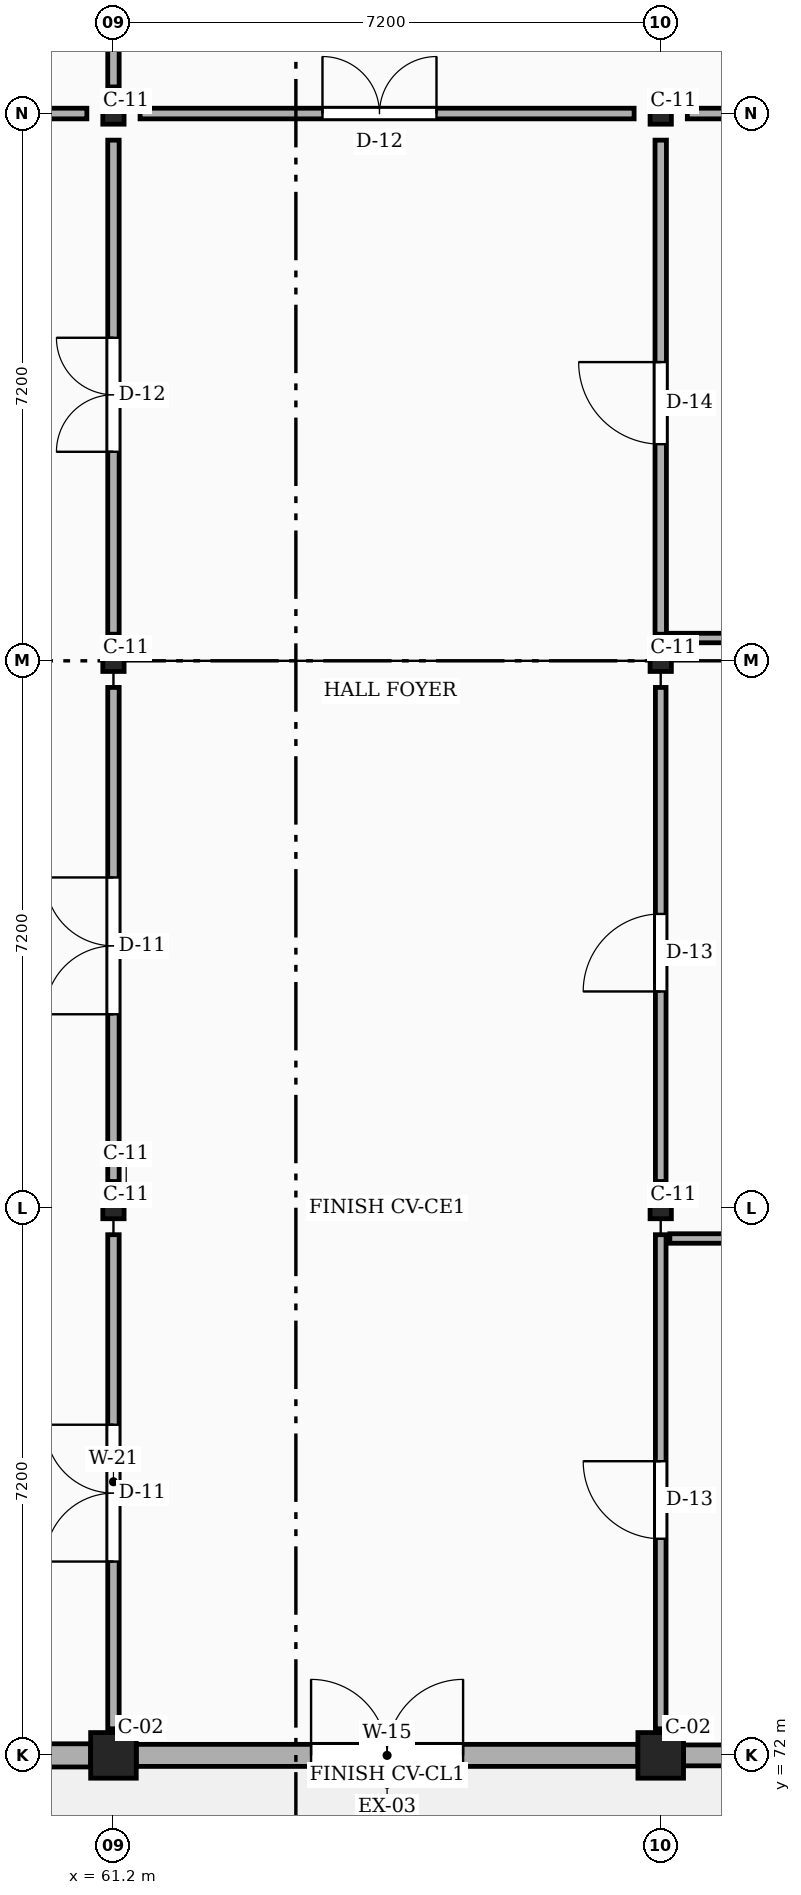
"""IFC4 building model, lengths in metres.
Left out: names, types, materials, properties, quantities, classifications, styles, units other than length and angle.
Written with IfcOpenShell. Run it as: python <this file> out.ifc"""

import sys

from ifc_helpers import new_model, si_unit, direction, frame, frame_2d, origin, origin_2d, place, context, subcontext, project, spatial, rectangle, i_section, extrude, element, fill, save


model = new_model("IFC4")
c1 = context("Model", 3, precision=1e-05, world=origin(), true_north=direction((0.0, 1.0)))
c2 = subcontext(c1, "Body", "Model", "MODEL_VIEW")
j1 = project(units=[si_unit("LENGTHUNIT", "METRE"), si_unit("PLANEANGLEUNIT", "RADIAN")], contexts=[c1])
p1 = place(None, origin())
s1 = spatial("IfcSite", under=j1, at=p1, CompositionType="ELEMENT")
p2 = place(p1, origin())
s2 = spatial("IfcBuilding", under=s1, at=p2, CompositionType="ELEMENT")
p3 = place(p2, origin())
s3 = spatial("IfcBuildingStorey", under=s2, at=p3, CompositionType="ELEMENT", Elevation=0.0)
p4 = place(p3, frame((61.2, 72.0, 0.0), z_axis=(0.0, 0.0, 1.0), x_axis=(1.0, 0.0, 0.0)))
e1 = element("IfcColumn", 1, at=p4, inside=s3, PredefinedType="COLUMN", context=c2, shape_type="SweptSolid", body=[
    extrude(rectangle(XDim=0.6, YDim=0.6, at=origin_2d()), origin(), (0.0, 0.0, 1.0), 8.1),
])
for number, where, z_axis, x_axis in (
    (2, (61.2, 79.2, 0.0), (0.0, 0.0, 1.0), (1.0, 0.0, 0.0)),
    (3, (61.2, 86.4, 0.0), (0.0, 0.0, 1.0), (1.0, 0.0, 0.0)),
    (4, (61.2, 93.6, 0.0), (0.0, 0.0, 1.0), (1.0, 0.0, 0.0)),
):
    element("IfcColumn", number, at=place(p3, frame(where, z_axis=z_axis, x_axis=x_axis)), inside=s3, PredefinedType="COLUMN", context=c2, shape_type="SweptSolid", body=[
        extrude(i_section(OverallWidth=0.28, OverallDepth=0.28, WebThickness=0.01, FlangeThickness=0.018, FilletRadius=0.024, at=origin_2d()), origin(), (0.0, 0.0, 1.0), 8.1),
    ])
p5 = place(p3, frame((68.4, 72.0, 0.0), z_axis=(0.0, 0.0, 1.0), x_axis=(1.0, 0.0, 0.0)))
e5 = element("IfcColumn", 5, at=p5, inside=s3, PredefinedType="COLUMN", context=c2, shape_type="SweptSolid", body=[
    extrude(rectangle(XDim=0.6, YDim=0.6, at=origin_2d()), origin(), (0.0, 0.0, 1.0), 8.1),
])
for number, where, z_axis, x_axis in (
    (6, (68.4, 79.2, 0.0), (0.0, 0.0, 1.0), (1.0, 0.0, 0.0)),
    (7, (68.4, 86.4, 0.0), (0.0, 0.0, 1.0), (1.0, 0.0, 0.0)),
    (8, (68.4, 93.6, 0.0), (0.0, 0.0, 1.0), (1.0, 0.0, 0.0)),
):
    element("IfcColumn", number, at=place(p3, frame(where, z_axis=z_axis, x_axis=x_axis)), inside=s3, PredefinedType="COLUMN", context=c2, shape_type="SweptSolid", body=[
        extrude(i_section(OverallWidth=0.28, OverallDepth=0.28, WebThickness=0.01, FlangeThickness=0.018, FilletRadius=0.024, at=origin_2d()), origin(), (0.0, 0.0, 1.0), 8.1),
    ])
p6 = place(p3, frame((54.3, 72.0, 0.0), z_axis=(0.0, 0.0, 1.0), x_axis=(1.0, 0.0, 0.0)))
e9 = element("IfcWall", 9, at=p6, inside=s3, PredefinedType="SOLIDWALL", context=c2, shape_type="SweptSolid", body=[
    extrude(rectangle(XDim=6.6, YDim=0.305, at=frame_2d((3.3, 0.0))), origin(), (0.0, 0.0, 1.0), 6.525),
])
p7 = place(p6, frame((2.4, 0.0, 0.0)))
e10 = element("IfcOpeningElement", 10, at=p7, cuts=e9, PredefinedType="OPENING", context=c2, shape_type="SweptSolid", body=[
    extrude(rectangle(XDim=1.8, YDim=2.2, at=frame_2d((0.9, 1.1))), frame((0.0, 0.163, 0.0), z_axis=(0.0, -1.0, 0.0), x_axis=(1.0, 0.0, 0.0)), (0.0, 0.0, 1.0), 0.325),
])
p8 = place(p3, frame((61.5, 72.0, 0.0), z_axis=(0.0, 0.0, 1.0), x_axis=(1.0, 0.0, 0.0)))
e11 = element("IfcWall", 11, at=p8, inside=s3, PredefinedType="SOLIDWALL", context=c2, shape_type="SweptSolid", body=[
    extrude(rectangle(XDim=6.6, YDim=0.29, at=frame_2d((3.3, 0.0))), origin(), (0.0, 0.0, 1.0), 6.525),
])
p9 = place(p8, frame((2.3, 0.0, 0.0)))
e12 = element("IfcOpeningElement", 12, at=p9, cuts=e11, PredefinedType="OPENING", context=c2, shape_type="SweptSolid", body=[
    extrude(rectangle(XDim=2.0, YDim=2.3, at=frame_2d((1.0, 1.15))), frame((0.0, 0.155, 0.0), z_axis=(0.0, -1.0, 0.0), x_axis=(1.0, 0.0, 0.0)), (0.0, 0.0, 1.0), 0.31),
])
p10 = place(p3, frame((68.7, 72.0, 0.0), z_axis=(0.0, 0.0, 1.0), x_axis=(1.0, 0.0, 0.0)))
e13 = element("IfcWall", 13, at=p10, inside=s3, PredefinedType="SOLIDWALL", context=c2, shape_type="SweptSolid", body=[
    extrude(rectangle(XDim=6.6, YDim=0.275, at=frame_2d((3.3, 0.0))), origin(), (0.0, 0.0, 1.0), 6.525),
])
p11 = place(p10, frame((2.4, 0.0, 0.85)))
e14 = element("IfcOpeningElement", 14, at=p11, cuts=e13, PredefinedType="OPENING", context=c2, shape_type="SweptSolid", body=[
    extrude(rectangle(XDim=1.8, YDim=2.1, at=frame_2d((0.9, 1.05))), frame((0.0, 0.147, 0.0), z_axis=(0.0, -1.0, 0.0), x_axis=(1.0, 0.0, 0.0)), (0.0, 0.0, 1.0), 0.295),
])
p12 = place(p3, frame((61.2, 72.35, 0.0), z_axis=(0.0, 0.0, 1.0), x_axis=(0.0, 1.0, 0.0)))
e15 = element("IfcWall", 15, at=p12, inside=s3, PredefinedType="PARTITIONING", context=c2, shape_type="SweptSolid", body=[
    extrude(rectangle(XDim=6.5, YDim=0.15, at=frame_2d((3.25, 0.0))), origin(), (0.0, 0.0, 1.0), 4.1),
])
p13 = place(p12, frame((2.2, 0.0, 0.0)))
e16 = element("IfcOpeningElement", 16, at=p13, cuts=e15, PredefinedType="OPENING", context=c2, shape_type="SweptSolid", body=[
    extrude(rectangle(XDim=1.8, YDim=2.3, at=frame_2d((0.9, 1.15))), frame((0.0, 0.085, 0.0), z_axis=(0.0, -1.0, 0.0), x_axis=(1.0, 0.0, 0.0)), (0.0, 0.0, 1.0), 0.17),
])
p14 = place(p3, frame((61.2, 79.55, 0.0), z_axis=(0.0, 0.0, 1.0), x_axis=(0.0, 1.0, 0.0)))
e17 = element("IfcWall", 17, at=p14, inside=s3, PredefinedType="PARTITIONING", context=c2, shape_type="SweptSolid", body=[
    extrude(rectangle(XDim=6.5, YDim=0.15, at=frame_2d((3.25, 0.0))), origin(), (0.0, 0.0, 1.0), 4.1),
])
p15 = place(p14, frame((2.2, 0.0, 0.0)))
e18 = element("IfcOpeningElement", 18, at=p15, cuts=e17, PredefinedType="OPENING", context=c2, shape_type="SweptSolid", body=[
    extrude(rectangle(XDim=1.8, YDim=2.3, at=frame_2d((0.9, 1.15))), frame((0.0, 0.085, 0.0), z_axis=(0.0, -1.0, 0.0), x_axis=(1.0, 0.0, 0.0)), (0.0, 0.0, 1.0), 0.17),
])
p16 = place(p3, frame((61.2, 86.75, 0.0), z_axis=(0.0, 0.0, 1.0), x_axis=(0.0, 1.0, 0.0)))
e19 = element("IfcWall", 19, at=p16, inside=s3, PredefinedType="PARTITIONING", context=c2, shape_type="SweptSolid", body=[
    extrude(rectangle(XDim=6.5, YDim=0.15, at=frame_2d((3.25, 0.0))), origin(), (0.0, 0.0, 1.0), 4.1),
])
p17 = place(p16, frame((2.4, 0.0, 0.0)))
e20 = element("IfcOpeningElement", 20, at=p17, cuts=e19, PredefinedType="OPENING", context=c2, shape_type="SweptSolid", body=[
    extrude(rectangle(XDim=1.5, YDim=2.25, at=frame_2d((0.75, 1.125))), frame((0.0, 0.085, 0.0), z_axis=(0.0, -1.0, 0.0), x_axis=(1.0, 0.0, 0.0)), (0.0, 0.0, 1.0), 0.17),
])
p18 = place(p3, frame((61.2, 93.95, 0.0), z_axis=(0.0, 0.0, 1.0), x_axis=(0.0, 1.0, 0.0)))
e21 = element("IfcWall", 21, at=p18, inside=s3, PredefinedType="PARTITIONING", context=c2, shape_type="SweptSolid", body=[
    extrude(rectangle(XDim=6.5, YDim=0.15, at=frame_2d((3.25, 0.0))), origin(), (0.0, 0.0, 1.0), 4.1),
])
p19 = place(p3, frame((39.95, 93.6, 0.0), z_axis=(0.0, 0.0, 1.0), x_axis=(1.0, 0.0, 0.0)))
e22 = element("IfcWall", 22, at=p19, inside=s3, PredefinedType="PARTITIONING", context=c2, shape_type="SweptSolid", body=[
    extrude(rectangle(XDim=20.9, YDim=0.14, at=frame_2d((10.45, 0.0))), origin(), (0.0, 0.0, 1.0), 4.1),
])
p20 = place(p19, frame((2.8, 0.0, 0.0)))
e23 = element("IfcOpeningElement", 23, at=p20, cuts=e22, PredefinedType="OPENING", context=c2, shape_type="SweptSolid", body=[
    extrude(rectangle(XDim=1.5, YDim=2.25, at=frame_2d((0.75, 1.125))), frame((0.0, 0.08, 0.0), z_axis=(0.0, -1.0, 0.0), x_axis=(1.0, 0.0, 0.0)), (0.0, 0.0, 1.0), 0.16),
])
p21 = place(p19, frame((15.6, 0.0, 0.0)))
e24 = element("IfcOpeningElement", 24, at=p21, cuts=e22, PredefinedType="OPENING", context=c2, shape_type="SweptSolid", body=[
    extrude(rectangle(XDim=1.5, YDim=2.25, at=frame_2d((0.75, 1.125))), frame((0.0, 0.08, 0.0), z_axis=(0.0, -1.0, 0.0), x_axis=(1.0, 0.0, 0.0)), (0.0, 0.0, 1.0), 0.16),
])
p22 = place(p3, frame((68.4, 72.35, 0.0), z_axis=(0.0, 0.0, 1.0), x_axis=(0.0, 1.0, 0.0)))
e25 = element("IfcWall", 25, at=p22, inside=s3, PredefinedType="PARTITIONING", context=c2, shape_type="SweptSolid", body=[
    extrude(rectangle(XDim=6.5, YDim=0.14, at=frame_2d((3.25, 0.0))), origin(), (0.0, 0.0, 1.0), 4.1),
])
p23 = place(p22, frame((2.5, 0.0, 0.0)))
e26 = element("IfcOpeningElement", 26, at=p23, cuts=e25, PredefinedType="OPENING", context=c2, shape_type="SweptSolid", body=[
    extrude(rectangle(XDim=1.02, YDim=2.15, at=frame_2d((0.51, 1.075))), frame((0.0, 0.08, 0.0), z_axis=(0.0, -1.0, 0.0), x_axis=(1.0, 0.0, 0.0)), (0.0, 0.0, 1.0), 0.16),
])
p24 = place(p3, frame((68.4, 79.55, 0.0), z_axis=(0.0, 0.0, 1.0), x_axis=(0.0, 1.0, 0.0)))
e27 = element("IfcWall", 27, at=p24, inside=s3, PredefinedType="PARTITIONING", context=c2, shape_type="SweptSolid", body=[
    extrude(rectangle(XDim=6.5, YDim=0.14, at=frame_2d((3.25, 0.0))), origin(), (0.0, 0.0, 1.0), 4.1),
])
p25 = place(p24, frame((2.5, 0.0, 0.0)))
e28 = element("IfcOpeningElement", 28, at=p25, cuts=e27, PredefinedType="OPENING", context=c2, shape_type="SweptSolid", body=[
    extrude(rectangle(XDim=1.02, YDim=2.15, at=frame_2d((0.51, 1.075))), frame((0.0, 0.08, 0.0), z_axis=(0.0, -1.0, 0.0), x_axis=(1.0, 0.0, 0.0)), (0.0, 0.0, 1.0), 0.16),
])
p26 = place(p3, frame((68.4, 86.75, 0.0), z_axis=(0.0, 0.0, 1.0), x_axis=(0.0, 1.0, 0.0)))
e29 = element("IfcWall", 29, at=p26, inside=s3, PredefinedType="PARTITIONING", context=c2, shape_type="SweptSolid", body=[
    extrude(rectangle(XDim=6.5, YDim=0.15, at=frame_2d((3.25, 0.0))), origin(), (0.0, 0.0, 1.0), 4.1),
])
p27 = place(p26, frame((2.5, 0.0, 0.0)))
e30 = element("IfcOpeningElement", 30, at=p27, cuts=e29, PredefinedType="OPENING", context=c2, shape_type="SweptSolid", body=[
    extrude(rectangle(XDim=1.08, YDim=2.15, at=frame_2d((0.54, 1.075))), frame((0.0, 0.085, 0.0), z_axis=(0.0, -1.0, 0.0), x_axis=(1.0, 0.0, 0.0)), (0.0, 0.0, 1.0), 0.17),
])
for number, where, z_axis, x_axis in (
    (31, (68.52, 78.8, 0.0), (0.0, 0.0, 1.0), (1.0, 0.0, 0.0)),
    (32, (68.52, 86.7, 0.0), (0.0, 0.0, 1.0), (1.0, 0.0, 0.0)),
):
    element("IfcWall", number, at=place(p3, frame(where, z_axis=z_axis, x_axis=x_axis)), inside=s3, PredefinedType="PARTITIONING", context=c2, shape_type="SweptSolid", body=[
        extrude(rectangle(XDim=6.905, YDim=0.125, at=frame_2d((3.453, 0.0))), origin(), (0.0, 0.0, 1.0), 4.1),
    ])
p28 = place(p3, frame((61.55, 93.6, 0.0), z_axis=(0.0, 0.0, 1.0), x_axis=(1.0, 0.0, 0.0)))
e33 = element("IfcWall", 33, at=p28, inside=s3, PredefinedType="PARTITIONING", context=c2, shape_type="SweptSolid", body=[
    extrude(rectangle(XDim=6.5, YDim=0.14, at=frame_2d((3.25, 0.0))), origin(), (0.0, 0.0, 1.0), 4.1),
])
p29 = place(p28, frame((2.4, 0.0, 0.0)))
e34 = element("IfcOpeningElement", 34, at=p29, cuts=e33, PredefinedType="OPENING", context=c2, shape_type="SweptSolid", body=[
    extrude(rectangle(XDim=1.5, YDim=2.25, at=frame_2d((0.75, 1.125))), frame((0.0, 0.08, 0.0), z_axis=(0.0, -1.0, 0.0), x_axis=(1.0, 0.0, 0.0)), (0.0, 0.0, 1.0), 0.16),
])
p30 = place(p3, frame((68.75, 93.6, 0.0), z_axis=(0.0, 0.0, 1.0), x_axis=(1.0, 0.0, 0.0)))
e35 = element("IfcWall", 35, at=p30, inside=s3, PredefinedType="PARTITIONING", context=c2, shape_type="SweptSolid", body=[
    extrude(rectangle(XDim=6.5, YDim=0.14, at=frame_2d((3.25, 0.0))), origin(), (0.0, 0.0, 1.0), 4.1),
])
p31 = place(p9, frame((2.0, 0.0, 0.0), z_axis=(0.0, 0.0, 1.0), x_axis=(-1.0, 0.0, 0.0)))
e36 = element("IfcDoor", 36, at=p31, inside=s3, OperationType="DOUBLE_DOOR_SINGLE_SWING", PredefinedType="DOOR", context=c2, shape_type="SweptSolid", body=[
    extrude(rectangle(XDim=2.0, YDim=2.3, at=frame_2d((1.0, 1.15))), frame((0.0, 0.025, 0.0), z_axis=(0.0, -1.0, 0.0), x_axis=(1.0, 0.0, 0.0)), (0.0, 0.0, 1.0), 0.05),
])
fill(e12, e36)
p32 = place(p13, origin())
e37 = element("IfcDoor", 37, at=p32, inside=s3, OperationType="DOUBLE_DOOR_SINGLE_SWING", PredefinedType="DOOR", context=c2, shape_type="SweptSolid", body=[
    extrude(rectangle(XDim=1.8, YDim=2.3, at=frame_2d((0.9, 1.15))), frame((0.0, 0.025, 0.0), z_axis=(0.0, -1.0, 0.0), x_axis=(1.0, 0.0, 0.0)), (0.0, 0.0, 1.0), 0.05),
])
fill(e16, e37)
p33 = place(p15, origin())
e38 = element("IfcDoor", 38, at=p33, inside=s3, OperationType="DOUBLE_DOOR_SINGLE_SWING", PredefinedType="DOOR", context=c2, shape_type="SweptSolid", body=[
    extrude(rectangle(XDim=1.8, YDim=2.3, at=frame_2d((0.9, 1.15))), frame((0.0, 0.025, 0.0), z_axis=(0.0, -1.0, 0.0), x_axis=(1.0, 0.0, 0.0)), (0.0, 0.0, 1.0), 0.05),
])
fill(e18, e38)
p34 = place(p17, origin())
e39 = element("IfcDoor", 39, at=p34, inside=s3, OperationType="DOUBLE_DOOR_SINGLE_SWING", PredefinedType="DOOR", context=c2, shape_type="SweptSolid", body=[
    extrude(rectangle(XDim=1.5, YDim=2.25, at=frame_2d((0.75, 1.125))), frame((0.0, 0.025, 0.0), z_axis=(0.0, -1.0, 0.0), x_axis=(1.0, 0.0, 0.0)), (0.0, 0.0, 1.0), 0.05),
])
fill(e20, e39)
p35 = place(p23, origin())
e40 = element("IfcDoor", 40, at=p35, inside=s3, OperationType="SINGLE_SWING_RIGHT", PredefinedType="DOOR", context=c2, shape_type="SweptSolid", body=[
    extrude(rectangle(XDim=1.02, YDim=2.15, at=frame_2d((0.51, 1.075))), frame((0.0, 0.025, 0.0), z_axis=(0.0, -1.0, 0.0), x_axis=(1.0, 0.0, 0.0)), (0.0, 0.0, 1.0), 0.05),
])
fill(e26, e40)
p36 = place(p25, origin())
e41 = element("IfcDoor", 41, at=p36, inside=s3, OperationType="SINGLE_SWING_LEFT", PredefinedType="DOOR", context=c2, shape_type="SweptSolid", body=[
    extrude(rectangle(XDim=1.02, YDim=2.15, at=frame_2d((0.51, 1.075))), frame((0.0, 0.025, 0.0), z_axis=(0.0, -1.0, 0.0), x_axis=(1.0, 0.0, 0.0)), (0.0, 0.0, 1.0), 0.05),
])
fill(e28, e41)
p37 = place(p27, origin())
e42 = element("IfcDoor", 42, at=p37, inside=s3, OperationType="SINGLE_SWING_RIGHT", PredefinedType="DOOR", context=c2, shape_type="SweptSolid", body=[
    extrude(rectangle(XDim=1.08, YDim=2.15, at=frame_2d((0.54, 1.075))), frame((0.0, 0.025, 0.0), z_axis=(0.0, -1.0, 0.0), x_axis=(1.0, 0.0, 0.0)), (0.0, 0.0, 1.0), 0.05),
])
fill(e30, e42)
p38 = place(p29, origin())
e43 = element("IfcDoor", 43, at=p38, inside=s3, OperationType="DOUBLE_DOOR_SINGLE_SWING", PredefinedType="DOOR", context=c2, shape_type="SweptSolid", body=[
    extrude(rectangle(XDim=1.5, YDim=2.25, at=frame_2d((0.75, 1.125))), frame((0.0, 0.025, 0.0), z_axis=(0.0, -1.0, 0.0), x_axis=(1.0, 0.0, 0.0)), (0.0, 0.0, 1.0), 0.05),
])
fill(e34, e43)
save(model, sys.argv[1])
